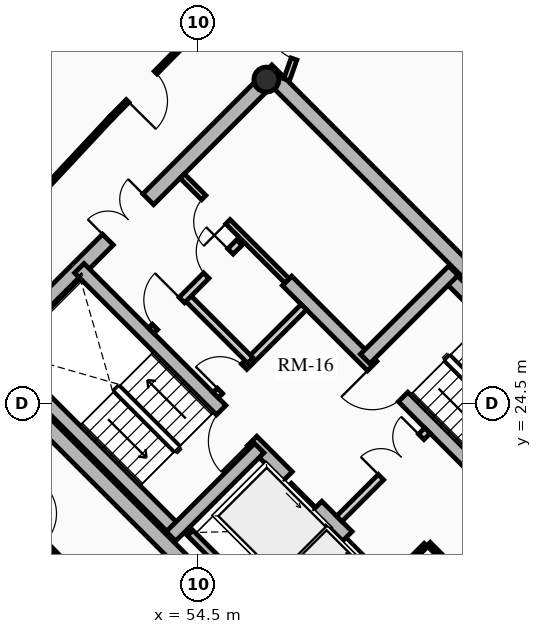
"""IFC4 building model, lengths in metres.
Left out: names, types, materials, properties, quantities, classifications, styles, units other than length and angle.
Written with IfcOpenShell. Run it as: python <this file> out.ifc"""

import sys

from ifc_helpers import new_model, si_unit, direction, frame, frame_2d, origin, origin_2d, place, context, subcontext, project, spatial, rectangle, hollow_circle, extrude, source, transform, mapped, element, fill, save


model = new_model("IFC4")
c1 = context("Model", 3, precision=1e-05, world=origin(), true_north=direction((0.0, 1.0)))
c2 = subcontext(c1, "Body", "Model", "MODEL_VIEW")
j1 = project(units=[si_unit("LENGTHUNIT", "METRE"), si_unit("PLANEANGLEUNIT", "RADIAN")], contexts=[c1])
p1 = place(None, origin())
s1 = spatial("IfcSite", under=j1, at=p1, CompositionType="ELEMENT")
p2 = place(p1, origin())
s2 = spatial("IfcBuilding", under=s1, at=p2, CompositionType="ELEMENT")
p3 = place(p2, frame((0.0, 0.0, 199.57)))
s3 = spatial("IfcBuildingStorey", under=s2, at=p3, CompositionType="ELEMENT", Elevation=199.57)
for number, where, z_axis, x_axis in (
    (1, (58.702, 15.732, 0.0), (0.0, 0.0, 1.0), (-0.707, 0.707, 0.0)),
    (2, (66.268, 23.298, 0.0), (0.0, 0.0, 1.0), (-0.707, 0.707, 0.0)),
):
    element("IfcWall", number, at=place(p3, frame(where, z_axis=z_axis, x_axis=x_axis)), inside=s3, PredefinedType="SHEAR", context=c2, shape_type="SweptSolid", body=[
        extrude(rectangle(XDim=14.1, YDim=0.4, at=frame_2d((7.05, 0.0))), origin(), (0.0, 0.0, 1.0), 2.91),
    ])
p4 = place(p3, frame((58.561, 15.873, 0.0), z_axis=(0.0, 0.0, 1.0), x_axis=(0.707106781187, 0.707106781187, 0.0)))
e3 = element("IfcWall", 3, at=p4, inside=s3, PredefinedType="SHEAR", context=c2, shape_type="SweptSolid", body=[
    extrude(rectangle(XDim=10.7, YDim=0.4, at=frame_2d((5.35, 0.0))), origin(), (0.0, 0.0, 1.0), 2.91),
])
m1 = source(origin(), c2, "Body", "SweptSolid", [
    extrude(rectangle(XDim=1.5, YDim=2.02, at=frame_2d((0.75, 1.01))), frame((0.0, 0.21, 0.0), z_axis=(0.0, -1.0, 0.0), x_axis=(1.0, 0.0, 0.0)), (0.0, 0.0, 1.0), 0.42),
])
p5 = place(p4, frame((5.45, 0.0, 0.0)))
e4 = element("IfcOpeningElement", 4, at=p5, cuts=e3, PredefinedType="OPENING", context=c2, shape_type="MappedRepresentation", body=[
    mapped(m1, transform((0.0, 0.0, 0.0), x_axis=(1.0, 0.0, 0.0), y_axis=(0.0, 1.0, 0.0), z_axis=(0.0, 0.0, 1.0), scale=1.0)),
])
p6 = place(p3, frame((48.873, 25.561, 0.0), z_axis=(0.0, 0.0, 1.0), x_axis=(0.707106781187, 0.707106781187, 0.0)))
e5 = element("IfcWall", 5, at=p6, inside=s3, PredefinedType="SHEAR", context=c2, shape_type="SweptSolid", body=[
    extrude(rectangle(XDim=10.7, YDim=0.4, at=frame_2d((5.35, 0.0))), origin(), (0.0, 0.0, 1.0), 2.91),
])
p7 = place(p6, frame((4.6, 0.0, 0.0)))
e6 = element("IfcOpeningElement", 6, at=p7, cuts=e5, PredefinedType="OPENING", context=c2, shape_type="MappedRepresentation", body=[
    mapped(m1, transform((0.0, 0.0, 0.0), x_axis=(1.0, 0.0, 0.0), y_axis=(0.0, 1.0, 0.0), z_axis=(0.0, 0.0, 1.0), scale=1.0)),
])
p8 = place(p3, frame((61.06, 18.373, 0.0), z_axis=(0.0, 0.0, 1.0), x_axis=(-0.707106781187, 0.707106781187, 0.0)))
e7 = element("IfcWall", 7, at=p8, inside=s3, PredefinedType="SHEAR", context=c2, shape_type="SweptSolid", body=[
    extrude(rectangle(XDim=13.7, YDim=0.35, at=frame_2d((6.85, 0.0))), origin(), (0.0, 0.0, 1.0), 2.91),
])
m2 = source(origin(), c2, "Body", "SweptSolid", [
    extrude(rectangle(XDim=1.1, YDim=2.015, at=frame_2d((0.55, 1.007))), frame((0.0, 0.185, 0.0), z_axis=(0.0, -1.0, 0.0), x_axis=(1.0, 0.0, 0.0)), (0.0, 0.0, 1.0), 0.37),
])
p9 = place(p8, frame((4.85, 0.0, 0.0)))
e8 = element("IfcOpeningElement", 8, at=p9, cuts=e7, PredefinedType="OPENING", context=c2, shape_type="MappedRepresentation", body=[
    mapped(m2, transform((0.0, 0.0, 0.0), x_axis=(1.0, 0.0, 0.0), y_axis=(0.0, 1.0, 0.0), z_axis=(0.0, 0.0, 1.0), scale=1.0)),
])
p10 = place(p8, frame((0.625, 0.0, 0.0)))
e9 = element("IfcOpeningElement", 9, at=p10, cuts=e7, PredefinedType="OPENING", context=c2, shape_type="MappedRepresentation", body=[
    mapped(m2, transform((0.0, 0.0, 0.0), x_axis=(1.0, 0.0, 0.0), y_axis=(0.0, 1.0, 0.0), z_axis=(0.0, 0.0, 1.0), scale=1.0)),
])
p11 = place(p8, frame((2.625, 0.0, 0.0)))
e10 = element("IfcOpeningElement", 10, at=p11, cuts=e7, PredefinedType="OPENING", context=c2, shape_type="MappedRepresentation", body=[
    mapped(m2, transform((0.0, 0.0, 0.0), x_axis=(1.0, 0.0, 0.0), y_axis=(0.0, 1.0, 0.0), z_axis=(0.0, 0.0, 1.0), scale=1.0)),
])
m3 = source(origin(), c2, "Body", "SweptSolid", [
    extrude(rectangle(XDim=1.15, YDim=2.02, at=frame_2d((0.575, 1.01))), frame((0.0, 0.185, 0.0), z_axis=(0.0, -1.0, 0.0), x_axis=(1.0, 0.0, 0.0)), (0.0, 0.0, 1.0), 0.37),
])
p12 = place(p8, frame((7.27, 0.0, 0.0)))
e11 = element("IfcOpeningElement", 11, at=p12, cuts=e7, PredefinedType="OPENING", context=c2, shape_type="MappedRepresentation", body=[
    mapped(m3, transform((0.0, 0.0, 0.0), x_axis=(1.0, 0.0, 0.0), y_axis=(0.0, 1.0, 0.0), z_axis=(0.0, 0.0, 1.0), scale=1.0)),
])
p13 = place(p3, frame((63.627, 20.94, 0.0), z_axis=(0.0, 0.0, 1.0), x_axis=(-0.707119496762, 0.707094065383, 0.0)))
e12 = element("IfcWall", 12, at=p13, inside=s3, PredefinedType="SHEAR", context=c2, shape_type="SweptSolid", body=[
    extrude(rectangle(XDim=9.6, YDim=0.35, at=frame_2d((4.8, 0.0))), origin(), (0.0, 0.0, 1.0), 2.91),
])
p14 = place(p13, frame((5.28, 0.0, 0.0)))
e13 = element("IfcOpeningElement", 13, at=p14, cuts=e12, PredefinedType="OPENING", context=c2, shape_type="MappedRepresentation", body=[
    mapped(m3, transform((0.0, 0.0, 0.0), x_axis=(1.0, 0.0, 0.0), y_axis=(0.0, 1.0, 0.0), z_axis=(0.0, 0.0, 1.0), scale=1.0)),
])
p15 = place(p3, frame((53.922, 21.141, 0.0), z_axis=(0.0, 0.0, 1.0), x_axis=(-0.707106781187, 0.707106781187, 0.0)))
e14 = element("IfcWall", 14, at=p15, inside=s3, PredefinedType="SHEAR", context=c2, shape_type="SweptSolid", body=[
    extrude(rectangle(XDim=6.695, YDim=0.35, at=frame_2d((3.348, 0.0))), origin(), (0.0, 0.0, 1.0), 2.91),
])
p16 = place(p3, frame((53.784, 21.003, 0.0), z_axis=(0.0, 0.0, 1.0), x_axis=(0.707106781187, 0.707106781187, 0.0)))
e15 = element("IfcWall", 15, at=p16, inside=s3, PredefinedType="SHEAR", context=c2, shape_type="SweptSolid", body=[
    extrude(rectangle(XDim=3.285, YDim=0.35, at=frame_2d((1.643, 0.0))), origin(), (0.0, 0.0, 1.0), 2.91),
])
p17 = place(p3, frame((65.812, 23.125, 0.0), z_axis=(0.0, 0.0, 1.0), x_axis=(-0.707106781187, 0.707106781187, 0.0)))
e16 = element("IfcWall", 16, at=p17, inside=s3, PredefinedType="SHEAR", context=c2, shape_type="SweptSolid", body=[
    extrude(rectangle(XDim=6.695, YDim=0.35, at=frame_2d((3.348, 0.0))), origin(), (0.0, 0.0, 1.0), 2.91),
])
p18 = place(p3, frame((58.893, 25.674, 0.0), z_axis=(0.0, 0.0, 1.0), x_axis=(0.707106781187, 0.707106781187, 0.0)))
e17 = element("IfcWall", 17, at=p18, inside=s3, PredefinedType="SHEAR", context=c2, shape_type="SweptSolid", body=[
    extrude(rectangle(XDim=3.285, YDim=0.35, at=frame_2d((1.643, 0.0))), origin(), (0.0, 0.0, 1.0), 2.91),
])
p19 = place(p3, frame((56.294, 33.024, 0.0), z_axis=(0.0, 0.0, 1.0), x_axis=(0.707106781187, 0.707106781187, 0.0)))
e18 = element("IfcColumn", 18, at=p19, inside=s3, PredefinedType="COLUMN", context=c2, shape_type="SweptSolid", body=[
    extrude(hollow_circle(Radius=0.33, WallThickness=0.025, at=origin_2d()), origin(), (0.0, 0.0, 1.0), 2.91),
])
p20 = place(p3, frame((55.888, 19.069, 0.0), z_axis=(0.0, 0.0, 1.0), x_axis=(0.707106781187, 0.707106781187, 0.0)))
e19 = element("IfcWall", 19, at=p20, inside=s3, PredefinedType="SHEAR", context=c2, shape_type="SweptSolid", body=[
    extrude(rectangle(XDim=2.97, YDim=0.2, at=frame_2d((1.485, 0.0))), origin(), (0.0, 0.0, 1.0), 2.91),
])
p21 = place(p3, frame((56.015, 19.366, 0.0), z_axis=(0.0, 0.0, 1.0), x_axis=(-0.707106781187, 0.707106781187, 0.0)))
e20 = element("IfcWall", 20, at=p21, inside=s3, PredefinedType="SHEAR", context=c2, shape_type="SweptSolid", body=[
    extrude(rectangle(XDim=2.44, YDim=0.2, at=frame_2d((1.22, 0.0))), origin(), (0.0, 0.0, 1.0), 2.91),
])
p22 = place(p3, frame((58.214, 21.467, 0.0), z_axis=(0.0, 0.0, 1.0), x_axis=(0.707106781187, 0.707106781187, 0.0)))
e21 = element("IfcWall", 21, at=p22, inside=s3, PredefinedType="PARTITIONING", context=c2, shape_type="SweptSolid", body=[
    extrude(rectangle(XDim=3.28, YDim=0.2, at=frame_2d((1.64, 0.0))), origin(), (0.0, 0.0, 1.0), 2.685),
])
m4 = source(origin(), c2, "Body", "SweptSolid", [
    extrude(rectangle(XDim=1.5, YDim=2.02, at=frame_2d((0.75, 1.01))), frame((0.0, 0.11, 0.0), z_axis=(0.0, -1.0, 0.0), x_axis=(1.0, 0.0, 0.0)), (0.0, 0.0, 1.0), 0.22),
])
p23 = place(p22, frame((1.55, 0.0, 0.0)))
e22 = element("IfcOpeningElement", 22, at=p23, cuts=e21, PredefinedType="OPENING", context=c2, shape_type="MappedRepresentation", body=[
    mapped(m4, transform((0.0, 0.0, 0.0), x_axis=(1.0, 0.0, 0.0), y_axis=(0.0, 1.0, 0.0), z_axis=(0.0, 0.0, 1.0), scale=1.0)),
])
p24 = place(p3, frame((54.961, 24.719, 0.0), z_axis=(0.0, 0.0, 1.0), x_axis=(0.707106781187, 0.707106781187, 0.0)))
e23 = element("IfcWall", 23, at=p24, inside=s3, PredefinedType="PARTITIONING", context=c2, shape_type="SweptSolid", body=[
    extrude(rectangle(XDim=3.28, YDim=0.2, at=frame_2d((1.64, 0.0))), origin(), (0.0, 0.0, 1.0), 2.685),
])
m5 = source(origin(), c2, "Body", "SweptSolid", [
    extrude(rectangle(XDim=0.9, YDim=2.005, at=frame_2d((0.45, 1.002))), frame((0.0, 0.11, 0.0), z_axis=(0.0, -1.0, 0.0), x_axis=(1.0, 0.0, 0.0)), (0.0, 0.0, 1.0), 0.22),
])
p25 = place(p24, frame((0.16, 0.0, 0.0)))
e24 = element("IfcOpeningElement", 24, at=p25, cuts=e23, PredefinedType="OPENING", context=c2, shape_type="MappedRepresentation", body=[
    mapped(m5, transform((0.0, 0.0, 0.0), x_axis=(1.0, 0.0, 0.0), y_axis=(0.0, 1.0, 0.0), z_axis=(0.0, 0.0, 1.0), scale=1.0)),
])
p26 = place(p3, frame((55.874, 25.631, 0.0), z_axis=(0.0, 0.0, 1.0), x_axis=(-0.707157639372, 0.707055919343, 0.0)))
e25 = element("IfcWall", 25, at=p26, inside=s3, PredefinedType="PARTITIONING", context=c2, shape_type="SweptSolid", body=[
    extrude(rectangle(XDim=2.4, YDim=0.2, at=frame_2d((1.2, 0.0))), origin(), (0.0, 0.0, 1.0), 2.685),
])
p27 = place(p3, frame((53.264, 26.416, 0.0), z_axis=(0.0, 0.0, 1.0), x_axis=(0.707106781187, 0.707106781187, 0.0)))
e26 = element("IfcWall", 26, at=p27, inside=s3, PredefinedType="PARTITIONING", context=c2, shape_type="SweptSolid", body=[
    extrude(rectangle(XDim=3.28, YDim=0.2, at=frame_2d((1.64, 0.0))), origin(), (0.0, 0.0, 1.0), 2.685),
])
m6 = source(origin(), c2, "Body", "SweptSolid", [
    extrude(rectangle(XDim=1.0, YDim=2.015, at=frame_2d((0.5, 1.007))), frame((0.0, 0.11, 0.0), z_axis=(0.0, -1.0, 0.0), x_axis=(1.0, 0.0, 0.0)), (0.0, 0.0, 1.0), 0.22),
])
p28 = place(p27, frame((0.14, 0.0, 0.0)))
e27 = element("IfcOpeningElement", 27, at=p28, cuts=e26, PredefinedType="OPENING", context=c2, shape_type="MappedRepresentation", body=[
    mapped(m6, transform((0.0, 0.0, 0.0), x_axis=(1.0, 0.0, 0.0), y_axis=(0.0, 1.0, 0.0), z_axis=(0.0, 0.0, 1.0), scale=1.0)),
])
p29 = place(p27, frame((2.05, 0.0, 0.0)))
e28 = element("IfcOpeningElement", 28, at=p29, cuts=e26, PredefinedType="OPENING", context=c2, shape_type="MappedRepresentation", body=[
    mapped(m5, transform((0.0, 0.0, 0.0), x_axis=(1.0, 0.0, 0.0), y_axis=(0.0, 1.0, 0.0), z_axis=(0.0, 0.0, 1.0), scale=1.0)),
])
p30 = place(p3, frame((61.835, 19.529, 0.0), z_axis=(0.0, 0.0, 1.0), x_axis=(-0.707174592913, 0.707038962956, 0.0)))
e29 = element("IfcWall", 29, at=p30, inside=s3, PredefinedType="PARTITIONING", context=c2, shape_type="SweptSolid", body=[
    extrude(rectangle(XDim=1.8, YDim=0.125, at=frame_2d((0.9, 0.0))), origin(), (0.0, 0.0, 1.0), 2.685),
])
m7 = source(origin(), c2, "Body", "SweptSolid", [
    extrude(rectangle(XDim=0.9, YDim=2.005, at=frame_2d((0.45, 1.002))), frame((0.0, 0.073, 0.0), z_axis=(0.0, -1.0, 0.0), x_axis=(1.0, 0.0, 0.0)), (0.0, 0.0, 1.0), 0.145),
])
p31 = place(p30, frame((0.42, 0.0, 0.0)))
e30 = element("IfcOpeningElement", 30, at=p31, cuts=e29, PredefinedType="OPENING", context=c2, shape_type="MappedRepresentation", body=[
    mapped(m7, transform((0.0, 0.0, 0.0), x_axis=(1.0, 0.0, 0.0), y_axis=(0.0, 1.0, 0.0), z_axis=(0.0, 0.0, 1.0), scale=1.0)),
])
p32 = place(p3, frame((59.713, 19.996, 0.0), z_axis=(0.0, 0.0, 1.0), x_axis=(0.707217726, 0.706995818963, 0.0)))
e31 = element("IfcWall", 31, at=p32, inside=s3, PredefinedType="PARTITIONING", context=c2, shape_type="SweptSolid", body=[
    extrude(rectangle(XDim=1.1, YDim=0.125, at=frame_2d((0.55, 0.0))), origin(), (0.0, 0.0, 1.0), 2.685),
])
p33 = place(p3, frame((56.839, 27.728, 0.0), z_axis=(0.0, 0.0, 1.0), x_axis=(-0.707106781187, 0.707106781187, 0.0)))
e32 = element("IfcWall", 32, at=p33, inside=s3, PredefinedType="PARTITIONING", context=c2, shape_type="SweptSolid", body=[
    extrude(rectangle(XDim=3.9, YDim=0.16, at=frame_2d((1.95, 0.0))), origin(), (0.0, 0.0, 1.0), 2.685),
])
m8 = source(origin(), c2, "Body", "SweptSolid", [
    extrude(rectangle(XDim=0.9, YDim=2.005, at=frame_2d((0.45, 1.002))), frame((0.0, 0.09, 0.0), z_axis=(0.0, -1.0, 0.0), x_axis=(1.0, 0.0, 0.0)), (0.0, 0.0, 1.0), 0.18),
])
p34 = place(p33, frame((2.2, 0.0, 0.0)))
e33 = element("IfcOpeningElement", 33, at=p34, cuts=e32, PredefinedType="OPENING", context=c2, shape_type="MappedRepresentation", body=[
    mapped(m8, transform((0.0, 0.0, 0.0), x_axis=(1.0, 0.0, 0.0), y_axis=(0.0, 1.0, 0.0), z_axis=(0.0, 0.0, 1.0), scale=1.0)),
])
p35 = place(p3, frame((54.506, 34.344, 0.0), z_axis=(0.0, 0.0, 1.0), x_axis=(-0.703053402247, -0.711137056824, 0.0)))
e34 = element("IfcWall", 34, at=p35, inside=s3, PredefinedType="MOVABLE", context=c2, shape_type="SweptSolid", body=[
    extrude(rectangle(XDim=3.262, YDim=0.1, at=frame_2d((1.631, 0.0))), origin(), (0.0, 0.0, 1.0), 2.322),
])
m9 = source(origin(), c2, "Body", "SweptSolid", [
    extrude(rectangle(XDim=1.05, YDim=2.015, at=frame_2d((0.525, 1.007))), frame((0.0, 0.06, 0.0), z_axis=(0.0, -1.0, 0.0), x_axis=(1.0, 0.0, 0.0)), (0.0, 0.0, 1.0), 0.12),
])
p36 = place(p35, frame((1.599, 0.0, 0.0)))
e35 = element("IfcOpeningElement", 35, at=p36, cuts=e34, PredefinedType="OPENING", context=c2, shape_type="MappedRepresentation", body=[
    mapped(m9, transform((0.0, 0.0, 0.0), x_axis=(1.0, 0.0, 0.0), y_axis=(0.0, 1.0, 0.0), z_axis=(0.0, 0.0, 1.0), scale=1.0)),
])
p37 = place(p3, frame((52.212, 32.024, 0.0), z_axis=(0.0, 0.0, 1.0), x_axis=(-0.682158998173, -0.731203871169, 0.0)))
e36 = element("IfcWall", 36, at=p37, inside=s3, PredefinedType="MOVABLE", context=c2, shape_type="SweptSolid", body=[
    extrude(rectangle(XDim=6.282, YDim=0.1, at=frame_2d((3.141, 0.0))), origin(), (0.0, 0.0, 1.0), 2.255),
])
p38 = place(p3, frame((48.052, 23.323, 0.0), z_axis=(0.0, 0.0, 1.0), x_axis=(0.696573981306, -0.717484974454, 0.0)))
e37 = element("IfcWall", 37, at=p38, inside=s3, PredefinedType="MOVABLE", context=c2, shape_type="SweptSolid", body=[
    extrude(rectangle(XDim=5.849, YDim=0.1, at=frame_2d((2.925, 0.0))), origin(), (0.0, 0.0, 1.0), 2.685),
])
p39 = place(p38, frame((2.4, 0.0, 0.0)))
e38 = element("IfcOpeningElement", 38, at=p39, cuts=e37, PredefinedType="OPENING", context=c2, shape_type="MappedRepresentation", body=[
    mapped(m9, transform((0.0, 0.0, 0.0), x_axis=(1.0, 0.0, 0.0), y_axis=(0.0, 1.0, 0.0), z_axis=(0.0, 0.0, 1.0), scale=1.0)),
])
p40 = place(p3, frame((56.828, 33.021, 0.0), z_axis=(0.0, 0.0, 1.0), x_axis=(0.334788446034, 0.942293317605, 0.0)))
e39 = element("IfcWall", 39, at=p40, inside=s3, PredefinedType="PARTITIONING", context=c2, shape_type="SweptSolid", body=[
    extrude(rectangle(XDim=1.829, YDim=0.16, at=frame_2d((0.915, 0.0))), origin(), (0.0, 0.0, 1.0), 2.255),
])
m10 = source(origin(), c2, "Body", "SweptSolid", [
    extrude(rectangle(XDim=1.05, YDim=2.015, at=frame_2d((0.525, 1.007))), frame((0.0, 0.09, 0.0), z_axis=(0.0, -1.0, 0.0), x_axis=(1.0, 0.0, 0.0)), (0.0, 0.0, 1.0), 0.18),
])
p41 = place(p40, frame((0.579, 0.0, 0.0)))
e40 = element("IfcOpeningElement", 40, at=p41, cuts=e39, PredefinedType="OPENING", context=c2, shape_type="MappedRepresentation", body=[
    mapped(m10, transform((0.0, 0.0, 0.0), x_axis=(1.0, 0.0, 0.0), y_axis=(0.0, 1.0, 0.0), z_axis=(0.0, 0.0, 1.0), scale=1.0)),
])
m11 = source(origin(), c2, "Body", "SweptSolid", [
    extrude(rectangle(XDim=1.1, YDim=2.015, at=frame_2d((0.55, 1.007))), frame((0.0, 0.025, 0.0), z_axis=(0.0, -1.0, 0.0), x_axis=(1.0, 0.0, 0.0)), (0.0, 0.0, 1.0), 0.05),
])
p42 = place(p9, origin())
e41 = element("IfcDoor", 41, at=p42, inside=s3, OperationType="SLIDING_TO_LEFT", PredefinedType="DOOR", context=c2, shape_type="MappedRepresentation", body=[
    mapped(m11, transform((0.0, 0.0, 0.0), x_axis=(1.0, 0.0, 0.0), y_axis=(0.0, 1.0, 0.0), z_axis=(0.0, 0.0, 1.0), scale=1.0)),
])
fill(e8, e41)
p43 = place(p11, origin())
e42 = element("IfcDoor", 42, at=p43, inside=s3, OperationType="SLIDING_TO_RIGHT", PredefinedType="DOOR", context=c2, shape_type="MappedRepresentation", body=[
    mapped(m11, transform((0.0, 0.0, 0.0), x_axis=(1.0, 0.0, 0.0), y_axis=(0.0, 1.0, 0.0), z_axis=(0.0, 0.0, 1.0), scale=1.0)),
])
fill(e10, e42)
m12 = source(origin(), c2, "Body", "SweptSolid", [
    extrude(rectangle(XDim=1.15, YDim=2.02, at=frame_2d((0.575, 1.01))), frame((0.0, 0.025, 0.0), z_axis=(0.0, -1.0, 0.0), x_axis=(1.0, 0.0, 0.0)), (0.0, 0.0, 1.0), 0.05),
])
p44 = place(p12, origin())
e43 = element("IfcDoor", 43, at=p44, inside=s3, OperationType="SINGLE_SWING_LEFT", PredefinedType="DOOR", context=c2, shape_type="MappedRepresentation", body=[
    mapped(m12, transform((0.0, 0.0, 0.0), x_axis=(1.0, 0.0, 0.0), y_axis=(0.0, 1.0, 0.0), z_axis=(0.0, 0.0, 1.0), scale=1.0)),
])
fill(e11, e43)
p45 = place(p14, origin())
e44 = element("IfcDoor", 44, at=p45, inside=s3, OperationType="SINGLE_SWING_RIGHT", PredefinedType="DOOR", context=c2, shape_type="MappedRepresentation", body=[
    mapped(m12, transform((0.0, 0.0, 0.0), x_axis=(1.0, 0.0, 0.0), y_axis=(0.0, 1.0, 0.0), z_axis=(0.0, 0.0, 1.0), scale=1.0)),
])
fill(e13, e44)
m13 = source(origin(), c2, "Body", "SweptSolid", [
    extrude(rectangle(XDim=1.5, YDim=2.02, at=frame_2d((0.75, 1.01))), frame((0.0, 0.025, 0.0), z_axis=(0.0, -1.0, 0.0), x_axis=(1.0, 0.0, 0.0)), (0.0, 0.0, 1.0), 0.05),
])
p46 = place(p7, origin())
e45 = element("IfcDoor", 45, at=p46, inside=s3, OperationType="DOUBLE_DOOR_SINGLE_SWING", PredefinedType="DOOR", context=c2, shape_type="MappedRepresentation", body=[
    mapped(m13, transform((0.0, 0.0, 0.0), x_axis=(1.0, 0.0, 0.0), y_axis=(0.0, 1.0, 0.0), z_axis=(0.0, 0.0, 1.0), scale=1.0)),
])
fill(e6, e45)
p47 = place(p23, origin())
e46 = element("IfcDoor", 46, at=p47, inside=s3, OperationType="DOUBLE_DOOR_SINGLE_SWING", PredefinedType="DOOR", context=c2, shape_type="MappedRepresentation", body=[
    mapped(m13, transform((0.0, 0.0, 0.0), x_axis=(1.0, 0.0, 0.0), y_axis=(0.0, 1.0, 0.0), z_axis=(0.0, 0.0, 1.0), scale=1.0)),
])
fill(e22, e46)
m14 = source(origin(), c2, "Body", "SweptSolid", [
    extrude(rectangle(XDim=0.9, YDim=2.005, at=frame_2d((0.45, 1.002))), frame((0.0, 0.025, 0.0), z_axis=(0.0, -1.0, 0.0), x_axis=(1.0, 0.0, 0.0)), (0.0, 0.0, 1.0), 0.05),
])
p48 = place(p25, origin())
e47 = element("IfcDoor", 47, at=p48, inside=s3, OperationType="SINGLE_SWING_LEFT", PredefinedType="DOOR", context=c2, shape_type="MappedRepresentation", body=[
    mapped(m14, transform((0.0, 0.0, 0.0), x_axis=(1.0, 0.0, 0.0), y_axis=(0.0, 1.0, 0.0), z_axis=(0.0, 0.0, 1.0), scale=1.0)),
])
fill(e24, e47)
m15 = source(origin(), c2, "Body", "SweptSolid", [
    extrude(rectangle(XDim=1.0, YDim=2.015, at=frame_2d((0.5, 1.007))), frame((0.0, 0.025, 0.0), z_axis=(0.0, -1.0, 0.0), x_axis=(1.0, 0.0, 0.0)), (0.0, 0.0, 1.0), 0.05),
])
p49 = place(p28, origin())
e48 = element("IfcDoor", 48, at=p49, inside=s3, OperationType="SINGLE_SWING_RIGHT", PredefinedType="DOOR", context=c2, shape_type="MappedRepresentation", body=[
    mapped(m15, transform((0.0, 0.0, 0.0), x_axis=(1.0, 0.0, 0.0), y_axis=(0.0, 1.0, 0.0), z_axis=(0.0, 0.0, 1.0), scale=1.0)),
])
fill(e27, e48)
p50 = place(p29, origin())
e49 = element("IfcDoor", 49, at=p50, inside=s3, OperationType="SINGLE_SWING_RIGHT", PredefinedType="DOOR", context=c2, shape_type="MappedRepresentation", body=[
    mapped(m14, transform((0.0, 0.0, 0.0), x_axis=(1.0, 0.0, 0.0), y_axis=(0.0, 1.0, 0.0), z_axis=(0.0, 0.0, 1.0), scale=1.0)),
])
fill(e28, e49)
p51 = place(p34, origin())
e50 = element("IfcDoor", 50, at=p51, inside=s3, OperationType="SINGLE_SWING_LEFT", PredefinedType="DOOR", context=c2, shape_type="MappedRepresentation", body=[
    mapped(m14, transform((0.0, 0.0, 0.0), x_axis=(1.0, 0.0, 0.0), y_axis=(0.0, 1.0, 0.0), z_axis=(0.0, 0.0, 1.0), scale=1.0)),
])
fill(e33, e50)
m16 = source(origin(), c2, "Body", "SweptSolid", [
    extrude(rectangle(XDim=1.05, YDim=2.015, at=frame_2d((0.525, 1.007))), frame((0.0, 0.025, 0.0), z_axis=(0.0, -1.0, 0.0), x_axis=(1.0, 0.0, 0.0)), (0.0, 0.0, 1.0), 0.05),
])
p52 = place(p41, origin())
e51 = element("IfcDoor", 51, at=p52, inside=s3, OperationType="SINGLE_SWING_RIGHT", PredefinedType="DOOR", context=c2, shape_type="MappedRepresentation", body=[
    mapped(m16, transform((0.0, 0.0, 0.0), x_axis=(1.0, 0.0, 0.0), y_axis=(0.0, 1.0, 0.0), z_axis=(0.0, 0.0, 1.0), scale=1.0)),
])
fill(e40, e51)
p53 = place(p36, origin())
e52 = element("IfcDoor", 52, at=p53, inside=s3, OperationType="SINGLE_SWING_RIGHT", PredefinedType="DOOR", context=c2, shape_type="MappedRepresentation", body=[
    mapped(m16, transform((0.0, 0.0, 0.0), x_axis=(1.0, 0.0, 0.0), y_axis=(0.0, 1.0, 0.0), z_axis=(0.0, 0.0, 1.0), scale=1.0)),
])
fill(e35, e52)
save(model, sys.argv[1])
